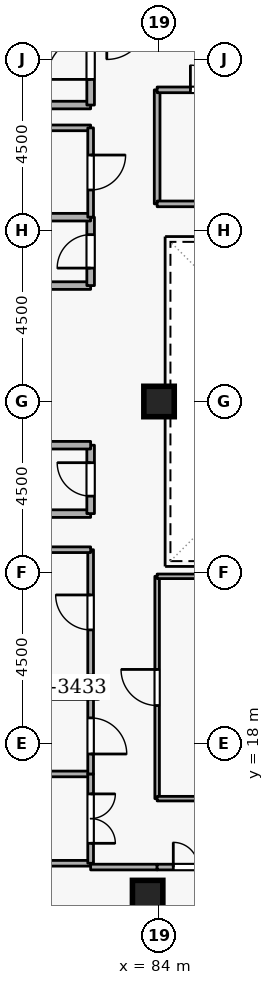
"""IFC4 building model, lengths in metres.
Left out: names, types, materials, properties, quantities, classifications, styles, units other than length and angle.
Written with IfcOpenShell. Run it as: python <this file> out.ifc"""

import sys

from ifc_helpers import new_model, si_unit, direction, frame, frame_2d, origin, origin_2d, place, context, subcontext, project, spatial, rectangle, extrude, element, fill, save


model = new_model("IFC4")
c1 = context("Model", 3, precision=1e-05, world=origin(), true_north=direction((0.0, 1.0)))
c2 = subcontext(c1, "Body", "Model", "MODEL_VIEW")
j1 = project(units=[si_unit("LENGTHUNIT", "METRE"), si_unit("PLANEANGLEUNIT", "RADIAN")], contexts=[c1])
p1 = place(None, origin())
s1 = spatial("IfcSite", under=j1, at=p1, CompositionType="ELEMENT")
p2 = place(p1, origin())
s2 = spatial("IfcBuilding", under=s1, at=p2, CompositionType="ELEMENT")
p3 = place(p2, frame((0.0, 0.0, 276.3)))
s3 = spatial("IfcBuildingStorey", under=s2, at=p3, CompositionType="ELEMENT", Elevation=276.3)
p4 = place(p3, frame((76.6, 19.45, 0.0), z_axis=(0.0, 0.0, 1.0), x_axis=(1.0, 0.0, 0.0)))
e1 = element("IfcWall", 1, at=p4, inside=s3, PredefinedType="SHEAR", context=c2, shape_type="SweptSolid", body=[
    extrude(rectangle(XDim=5.8, YDim=0.5, at=frame_2d((2.9, 0.0))), origin(), (0.0, 0.0, 1.0), 3.6),
])
for number, where, z_axis, x_axis in (
    (2, (83.7, 14.0, 0.0), (0.0, 0.0, 1.0), (1.0, 0.0, 0.0)),
    (3, (84.0, 27.0, 0.0), (0.0, 0.0, 1.0), (1.0, 0.0, 0.0)),
):
    element("IfcColumn", number, at=place(p3, frame(where, z_axis=z_axis, x_axis=x_axis)), inside=s3, PredefinedType="COLUMN", context=c2, shape_type="SweptSolid", body=[
        extrude(rectangle(XDim=0.8, YDim=0.8, at=origin_2d()), origin(), (0.0, 0.0, 1.0), 3.6),
    ])
p5 = place(p3, frame((79.9, 34.8, 0.0), z_axis=(0.0, 0.0, 1.0), x_axis=(1.0, 0.0, 0.0)))
e4 = element("IfcWall", 4, at=p5, inside=s3, PredefinedType="STANDARD", context=c2, shape_type="SweptSolid", body=[
    extrude(rectangle(XDim=2.3, YDim=0.2, at=frame_2d((1.15, 0.0))), origin(), (0.0, 0.0, 1.0), 2.465),
])
p6 = place(p3, frame((82.2, 34.8, 0.0), z_axis=(0.0, 0.0, 1.0), x_axis=(0.0, 1.0, 0.0)))
e5 = element("IfcWall", 5, at=p6, inside=s3, PredefinedType="STANDARD", context=c2, shape_type="SweptSolid", body=[
    extrude(rectangle(XDim=2.5, YDim=0.2, at=frame_2d((1.25, 0.0))), origin(), (0.0, 0.0, 1.0), 3.26),
])
p7 = place(p6, frame((0.675, 0.0, 0.0)))
e6 = element("IfcOpeningElement", 6, at=p7, cuts=e5, PredefinedType="OPENING", context=c2, shape_type="SweptSolid", body=[
    extrude(rectangle(XDim=1.15, YDim=2.1, at=frame_2d((0.575, 1.05))), frame((0.0, 0.11, 0.0), z_axis=(0.0, -1.0, 0.0), x_axis=(1.0, 0.0, 0.0)), (0.0, 0.0, 1.0), 0.22),
])
p8 = place(p3, frame((80.15, 24.05, 0.0), z_axis=(0.0, 0.0, 1.0), x_axis=(1.0, 0.0, 0.0)))
e7 = element("IfcWall", 7, at=p8, inside=s3, PredefinedType="STANDARD", context=c2, shape_type="SweptSolid", body=[
    extrude(rectangle(XDim=2.05, YDim=0.2, at=frame_2d((1.025, 0.0))), origin(), (0.0, 0.0, 1.0), 3.26),
])
p9 = place(p3, frame((82.2, 24.05, 0.0), z_axis=(0.0, 0.0, 1.0), x_axis=(0.0, 1.0, 0.0)))
e8 = element("IfcWall", 8, at=p9, inside=s3, PredefinedType="STANDARD", context=c2, shape_type="SweptSolid", body=[
    extrude(rectangle(XDim=1.8, YDim=0.2, at=frame_2d((0.9, 0.0))), origin(), (0.0, 0.0, 1.0), 3.26),
])
p10 = place(p9, frame((0.46, 0.0, 0.0)))
e9 = element("IfcOpeningElement", 9, at=p10, cuts=e8, PredefinedType="OPENING", context=c2, shape_type="SweptSolid", body=[
    extrude(rectangle(XDim=0.88, YDim=2.04, at=frame_2d((0.44, 1.02))), frame((0.0, 0.11, 0.0), z_axis=(0.0, -1.0, 0.0), x_axis=(1.0, 0.0, 0.0)), (0.0, 0.0, 1.0), 0.22),
])
for number, where, z_axis, x_axis in (
    (10, (82.2, 25.85, 0.0), (0.0, 0.0, 1.0), (-1.0, 0.0, 0.0)),
    (11, (80.15, 30.05, 0.0), (0.0, 0.0, 1.0), (1.0, 0.0, 0.0)),
):
    element("IfcWall", number, at=place(p3, frame(where, z_axis=z_axis, x_axis=x_axis)), inside=s3, PredefinedType="STANDARD", context=c2, shape_type="SweptSolid", body=[
        extrude(rectangle(XDim=2.05, YDim=0.2, at=frame_2d((1.025, 0.0))), origin(), (0.0, 0.0, 1.0), 3.26),
    ])
p11 = place(p3, frame((82.2, 30.05, 0.0), z_axis=(0.0, 0.0, 1.0), x_axis=(0.0, 1.0, 0.0)))
e12 = element("IfcWall", 12, at=p11, inside=s3, PredefinedType="STANDARD", context=c2, shape_type="SweptSolid", body=[
    extrude(rectangle(XDim=1.8, YDim=0.2, at=frame_2d((0.9, 0.0))), origin(), (0.0, 0.0, 1.0), 3.26),
])
p12 = place(p11, frame((0.46, 0.0, 0.0)))
e13 = element("IfcOpeningElement", 13, at=p12, cuts=e12, PredefinedType="OPENING", context=c2, shape_type="SweptSolid", body=[
    extrude(rectangle(XDim=0.88, YDim=2.04, at=frame_2d((0.44, 1.02))), frame((0.0, 0.11, 0.0), z_axis=(0.0, -1.0, 0.0), x_axis=(1.0, 0.0, 0.0)), (0.0, 0.0, 1.0), 0.22),
])
p13 = place(p3, frame((82.2, 31.85, 0.0), z_axis=(0.0, 0.0, 1.0), x_axis=(-1.0, 0.0, 0.0)))
e14 = element("IfcWall", 14, at=p13, inside=s3, PredefinedType="STANDARD", context=c2, shape_type="SweptSolid", body=[
    extrude(rectangle(XDim=2.05, YDim=0.2, at=frame_2d((1.025, 0.0))), origin(), (0.0, 0.0, 1.0), 3.26),
])
p14 = place(p3, frame((82.2, 19.8, 0.0), z_axis=(0.0, 0.0, 1.0), x_axis=(0.0, 1.0, 0.0)))
e15 = element("IfcWall", 15, at=p14, inside=s3, PredefinedType="PARTITIONING", context=c2, shape_type="SweptSolid", body=[
    extrude(rectangle(XDim=3.3, YDim=0.15, at=frame_2d((1.65, 0.0))), origin(), (0.0, 0.0, 1.0), 3.26),
])
p15 = place(p14, frame((1.19, 0.0, 0.0)))
e16 = element("IfcOpeningElement", 16, at=p15, cuts=e15, PredefinedType="OPENING", context=c2, shape_type="SweptSolid", body=[
    extrude(rectangle(XDim=0.92, YDim=2.08, at=frame_2d((0.46, 1.04))), frame((0.0, 0.085, 0.0), z_axis=(0.0, -1.0, 0.0), x_axis=(1.0, 0.0, 0.0)), (0.0, 0.0, 1.0), 0.17),
])
p16 = place(p3, frame((82.2, 23.1, 0.0), z_axis=(0.0, 0.0, 1.0), x_axis=(-1.0, 0.0, 0.0)))
e17 = element("IfcWall", 17, at=p16, inside=s3, PredefinedType="PARTITIONING", context=c2, shape_type="SweptSolid", body=[
    extrude(rectangle(XDim=2.05, YDim=0.15, at=frame_2d((1.025, 0.0))), origin(), (0.0, 0.0, 1.0), 3.26),
])
p17 = place(p3, frame((80.15, 34.2, 0.0), z_axis=(0.0, 0.0, 1.0), x_axis=(1.0, 0.0, 0.0)))
e18 = element("IfcWall", 18, at=p17, inside=s3, PredefinedType="PARTITIONING", context=c2, shape_type="SweptSolid", body=[
    extrude(rectangle(XDim=2.05, YDim=0.15, at=frame_2d((1.025, 0.0))), origin(), (0.0, 0.0, 1.0), 2.465),
])
p18 = place(p3, frame((82.2, 34.2, 0.0), z_axis=(0.0, 0.0, 1.0), x_axis=(0.0, -1.0, 0.0)))
e19 = element("IfcWall", 19, at=p18, inside=s3, PredefinedType="PARTITIONING", context=c2, shape_type="SweptSolid", body=[
    extrude(rectangle(XDim=2.35, YDim=0.15, at=frame_2d((1.175, 0.0))), origin(), (0.0, 0.0, 1.0), 3.26),
])
p19 = place(p18, frame((0.715, 0.0, 0.0)))
e20 = element("IfcOpeningElement", 20, at=p19, cuts=e19, PredefinedType="OPENING", context=c2, shape_type="SweptSolid", body=[
    extrude(rectangle(XDim=0.92, YDim=2.08, at=frame_2d((0.46, 1.04))), frame((0.0, 0.085, 0.0), z_axis=(0.0, -1.0, 0.0), x_axis=(1.0, 0.0, 0.0)), (0.0, 0.0, 1.0), 0.17),
])
for number, where, z_axis, x_axis in (
    (21, (82.2, 14.85, 0.0), (0.0, 0.0, 1.0), (-1.0, 0.0, 0.0)),
    (22, (70.78, 17.2, 0.0), (0.0, 0.0, 1.0), (1.0, 0.0, 0.0)),
):
    element("IfcWall", number, at=place(p3, frame(where, z_axis=z_axis, x_axis=x_axis)), inside=s3, PredefinedType="PARTITIONING", context=c2, shape_type="SweptSolid", body=[
        extrude(rectangle(XDim=11.42, YDim=0.15, at=frame_2d((5.71, 0.0))), origin(), (0.0, 0.0, 1.0), 3.26),
    ])
p20 = place(p3, frame((82.2, 17.2, 0.0), z_axis=(0.0, 0.0, 1.0), x_axis=(0.0, -1.0, 0.0)))
e23 = element("IfcWall", 23, at=p20, inside=s3, PredefinedType="PARTITIONING", context=c2, shape_type="SweptSolid", body=[
    extrude(rectangle(XDim=2.35, YDim=0.15, at=frame_2d((1.175, 0.0))), origin(), (0.0, 0.0, 1.0), 3.26),
])
p21 = place(p20, frame((0.525, 0.0, 0.0)))
e24 = element("IfcOpeningElement", 24, at=p21, cuts=e23, PredefinedType="OPENING", context=c2, shape_type="SweptSolid", body=[
    extrude(rectangle(XDim=1.3, YDim=2.12, at=frame_2d((0.65, 1.06))), frame((0.0, 0.085, 0.0), z_axis=(0.0, -1.0, 0.0), x_axis=(1.0, 0.0, 0.0)), (0.0, 0.0, 1.0), 0.17),
])
p22 = place(p3, frame((82.2, 19.2, 0.0), z_axis=(0.0, 0.0, 1.0), x_axis=(0.0, -1.0, 0.0)))
e25 = element("IfcWall", 25, at=p22, inside=s3, PredefinedType="PARTITIONING", context=c2, shape_type="SweptSolid", body=[
    extrude(rectangle(XDim=2.0, YDim=0.15, at=frame_2d((1.0, 0.0))), origin(), (0.0, 0.0, 1.0), 3.26),
])
p23 = place(p22, frame((0.525, 0.0, 0.0)))
e26 = element("IfcOpeningElement", 26, at=p23, cuts=e25, PredefinedType="OPENING", context=c2, shape_type="SweptSolid", body=[
    extrude(rectangle(XDim=0.95, YDim=2.1, at=frame_2d((0.475, 1.05))), frame((0.0, 0.085, 0.0), z_axis=(0.0, -1.0, 0.0), x_axis=(1.0, 0.0, 0.0)), (0.0, 0.0, 1.0), 0.17),
])
p24 = place(p3, frame((82.2, 14.75, 0.0), z_axis=(0.0, 0.0, 1.0), x_axis=(1.0, 0.0, 0.0)))
e27 = element("IfcWall", 27, at=p24, inside=s3, PredefinedType="PARTITIONING", context=c2, shape_type="SweptSolid", body=[
    extrude(rectangle(XDim=1.75, YDim=0.15, at=frame_2d((0.875, 0.0))), origin(), (0.0, 0.0, 1.0), 3.26),
])
p25 = place(p3, frame((83.95, 14.75, 0.0), z_axis=(0.0, 0.0, 1.0), x_axis=(1.0, 0.0, 0.0)))
e28 = element("IfcWall", 28, at=p25, inside=s3, PredefinedType="PARTITIONING", context=c2, shape_type="SweptSolid", body=[
    extrude(rectangle(XDim=2.15, YDim=0.15, at=frame_2d((1.075, 0.0))), origin(), (0.0, 0.0, 1.0), 3.26),
])
p26 = place(p25, frame((0.425, 0.0, 0.0)))
e29 = element("IfcOpeningElement", 29, at=p26, cuts=e28, PredefinedType="OPENING", context=c2, shape_type="SweptSolid", body=[
    extrude(rectangle(XDim=1.3, YDim=2.12, at=frame_2d((0.65, 1.06))), frame((0.0, 0.085, 0.0), z_axis=(0.0, -1.0, 0.0), x_axis=(1.0, 0.0, 0.0)), (0.0, 0.0, 1.0), 0.17),
])
p27 = place(p3, frame((83.95, 16.55, 0.0), z_axis=(0.0, 0.0, 1.0), x_axis=(0.0, 1.0, 0.0)))
e30 = element("IfcWall", 30, at=p27, inside=s3, PredefinedType="PARTITIONING", context=c2, shape_type="SweptSolid", body=[
    extrude(rectangle(XDim=5.85, YDim=0.12, at=frame_2d((2.925, 0.0))), origin(), (0.0, 0.0, 1.0), 3.26),
])
p28 = place(p27, frame((2.45, 0.0, 0.0)))
e31 = element("IfcOpeningElement", 31, at=p28, cuts=e30, PredefinedType="OPENING", context=c2, shape_type="SweptSolid", body=[
    extrude(rectangle(XDim=0.95, YDim=2.1, at=frame_2d((0.475, 1.05))), frame((0.0, 0.07, 0.0), z_axis=(0.0, -1.0, 0.0), x_axis=(1.0, 0.0, 0.0)), (0.0, 0.0, 1.0), 0.14),
])
for number, where, z_axis, x_axis in (
    (32, (83.95, 22.4, 0.0), (0.0, 0.0, 1.0), (1.0, 0.0, 0.0)),
    (33, (89.3, 16.55, 0.0), (0.0, 0.0, 1.0), (-1.0, 0.0, 0.0)),
):
    element("IfcWall", number, at=place(p3, frame(where, z_axis=z_axis, x_axis=x_axis)), inside=s3, PredefinedType="PARTITIONING", context=c2, shape_type="SweptSolid", body=[
        extrude(rectangle(XDim=5.35, YDim=0.12, at=frame_2d((2.675, 0.0))), origin(), (0.0, 0.0, 1.0), 3.26),
    ])
p29 = place(p3, frame((83.95, 32.2, 0.0), z_axis=(0.0, 0.0, 1.0), x_axis=(0.0, 1.0, 0.0)))
e34 = element("IfcWall", 34, at=p29, inside=s3, PredefinedType="PARTITIONING", context=c2, shape_type="SweptSolid", body=[
    extrude(rectangle(XDim=3.0, YDim=0.15, at=frame_2d((1.5, 0.0))), origin(), (0.0, 0.0, 1.0), 3.26),
])
p30 = place(p3, frame((83.95, 35.2, 0.0), z_axis=(0.0, 0.0, 1.0), x_axis=(1.0, 0.0, 0.0)))
e35 = element("IfcWall", 35, at=p30, inside=s3, PredefinedType="PARTITIONING", context=c2, shape_type="SweptSolid", body=[
    extrude(rectangle(XDim=3.05, YDim=0.15, at=frame_2d((1.525, 0.0))), origin(), (0.0, 0.0, 1.0), 3.26),
])
p31 = place(p30, frame((0.875, 0.0, 0.0)))
e36 = element("IfcOpeningElement", 36, at=p31, cuts=e35, PredefinedType="OPENING", context=c2, shape_type="SweptSolid", body=[
    extrude(rectangle(XDim=1.3, YDim=2.12, at=frame_2d((0.65, 1.06))), frame((0.0, 0.085, 0.0), z_axis=(0.0, -1.0, 0.0), x_axis=(1.0, 0.0, 0.0)), (0.0, 0.0, 1.0), 0.17),
])
p32 = place(p3, frame((87.0, 32.2, 0.0), z_axis=(0.0, 0.0, 1.0), x_axis=(-1.0, 0.0, 0.0)))
e37 = element("IfcWall", 37, at=p32, inside=s3, PredefinedType="PARTITIONING", context=c2, shape_type="SweptSolid", body=[
    extrude(rectangle(XDim=3.05, YDim=0.15, at=frame_2d((1.525, 0.0))), origin(), (0.0, 0.0, 1.0), 3.26),
])
p33 = place(p7, origin())
e38 = element("IfcDoor", 38, at=p33, inside=s3, OperationType="SINGLE_SWING_LEFT", PredefinedType="DOOR", context=c2, shape_type="SweptSolid", body=[
    extrude(rectangle(XDim=1.15, YDim=2.1, at=frame_2d((0.575, 1.05))), frame((0.0, 0.025, 0.0), z_axis=(0.0, -1.0, 0.0), x_axis=(1.0, 0.0, 0.0)), (0.0, 0.0, 1.0), 0.05),
])
fill(e6, e38)
p34 = place(p10, origin())
e39 = element("IfcDoor", 39, at=p34, inside=s3, OperationType="SINGLE_SWING_RIGHT", PredefinedType="DOOR", context=c2, shape_type="SweptSolid", body=[
    extrude(rectangle(XDim=0.88, YDim=2.04, at=frame_2d((0.44, 1.02))), frame((0.0, 0.025, 0.0), z_axis=(0.0, -1.0, 0.0), x_axis=(1.0, 0.0, 0.0)), (0.0, 0.0, 1.0), 0.05),
])
fill(e9, e39)
p35 = place(p12, origin())
e40 = element("IfcDoor", 40, at=p35, inside=s3, OperationType="SINGLE_SWING_LEFT", PredefinedType="DOOR", context=c2, shape_type="SweptSolid", body=[
    extrude(rectangle(XDim=0.88, YDim=2.04, at=frame_2d((0.44, 1.02))), frame((0.0, 0.025, 0.0), z_axis=(0.0, -1.0, 0.0), x_axis=(1.0, 0.0, 0.0)), (0.0, 0.0, 1.0), 0.05),
])
fill(e13, e40)
p36 = place(p15, origin())
e41 = element("IfcDoor", 41, at=p36, inside=s3, OperationType="SINGLE_SWING_RIGHT", PredefinedType="DOOR", context=c2, shape_type="SweptSolid", body=[
    extrude(rectangle(XDim=0.92, YDim=2.08, at=frame_2d((0.46, 1.04))), frame((0.0, 0.025, 0.0), z_axis=(0.0, -1.0, 0.0), x_axis=(1.0, 0.0, 0.0)), (0.0, 0.0, 1.0), 0.05),
])
fill(e16, e41)
p37 = place(p19, origin())
e42 = element("IfcDoor", 42, at=p37, inside=s3, OperationType="SINGLE_SWING_LEFT", PredefinedType="DOOR", context=c2, shape_type="SweptSolid", body=[
    extrude(rectangle(XDim=0.92, YDim=2.08, at=frame_2d((0.46, 1.04))), frame((0.0, 0.025, 0.0), z_axis=(0.0, -1.0, 0.0), x_axis=(1.0, 0.0, 0.0)), (0.0, 0.0, 1.0), 0.05),
])
fill(e20, e42)
p38 = place(p21, origin())
e43 = element("IfcDoor", 43, at=p38, inside=s3, OperationType="DOUBLE_DOOR_SINGLE_SWING", PredefinedType="DOOR", context=c2, shape_type="SweptSolid", body=[
    extrude(rectangle(XDim=1.3, YDim=2.12, at=frame_2d((0.65, 1.06))), frame((0.0, 0.025, 0.0), z_axis=(0.0, -1.0, 0.0), x_axis=(1.0, 0.0, 0.0)), (0.0, 0.0, 1.0), 0.05),
])
fill(e24, e43)
p39 = place(p23, origin())
e44 = element("IfcDoor", 44, at=p39, inside=s3, OperationType="SINGLE_SWING_RIGHT", PredefinedType="DOOR", context=c2, shape_type="SweptSolid", body=[
    extrude(rectangle(XDim=0.95, YDim=2.1, at=frame_2d((0.475, 1.05))), frame((0.0, 0.025, 0.0), z_axis=(0.0, -1.0, 0.0), x_axis=(1.0, 0.0, 0.0)), (0.0, 0.0, 1.0), 0.05),
])
fill(e26, e44)
p40 = place(p26, origin())
e45 = element("IfcDoor", 45, at=p40, inside=s3, OperationType="DOUBLE_DOOR_SINGLE_SWING", PredefinedType="DOOR", context=c2, shape_type="SweptSolid", body=[
    extrude(rectangle(XDim=1.3, YDim=2.12, at=frame_2d((0.65, 1.06))), frame((0.0, 0.025, 0.0), z_axis=(0.0, -1.0, 0.0), x_axis=(1.0, 0.0, 0.0)), (0.0, 0.0, 1.0), 0.05),
])
fill(e29, e45)
p41 = place(p28, origin())
e46 = element("IfcDoor", 46, at=p41, inside=s3, OperationType="SINGLE_SWING_RIGHT", PredefinedType="DOOR", context=c2, shape_type="SweptSolid", body=[
    extrude(rectangle(XDim=0.95, YDim=2.1, at=frame_2d((0.475, 1.05))), frame((0.0, 0.025, 0.0), z_axis=(0.0, -1.0, 0.0), x_axis=(1.0, 0.0, 0.0)), (0.0, 0.0, 1.0), 0.05),
])
fill(e31, e46)
p42 = place(p31, origin())
e47 = element("IfcDoor", 47, at=p42, inside=s3, OperationType="DOUBLE_DOOR_SINGLE_SWING", PredefinedType="DOOR", context=c2, shape_type="SweptSolid", body=[
    extrude(rectangle(XDim=1.3, YDim=2.12, at=frame_2d((0.65, 1.06))), frame((0.0, 0.025, 0.0), z_axis=(0.0, -1.0, 0.0), x_axis=(1.0, 0.0, 0.0)), (0.0, 0.0, 1.0), 0.05),
])
fill(e36, e47)
save(model, sys.argv[1])
